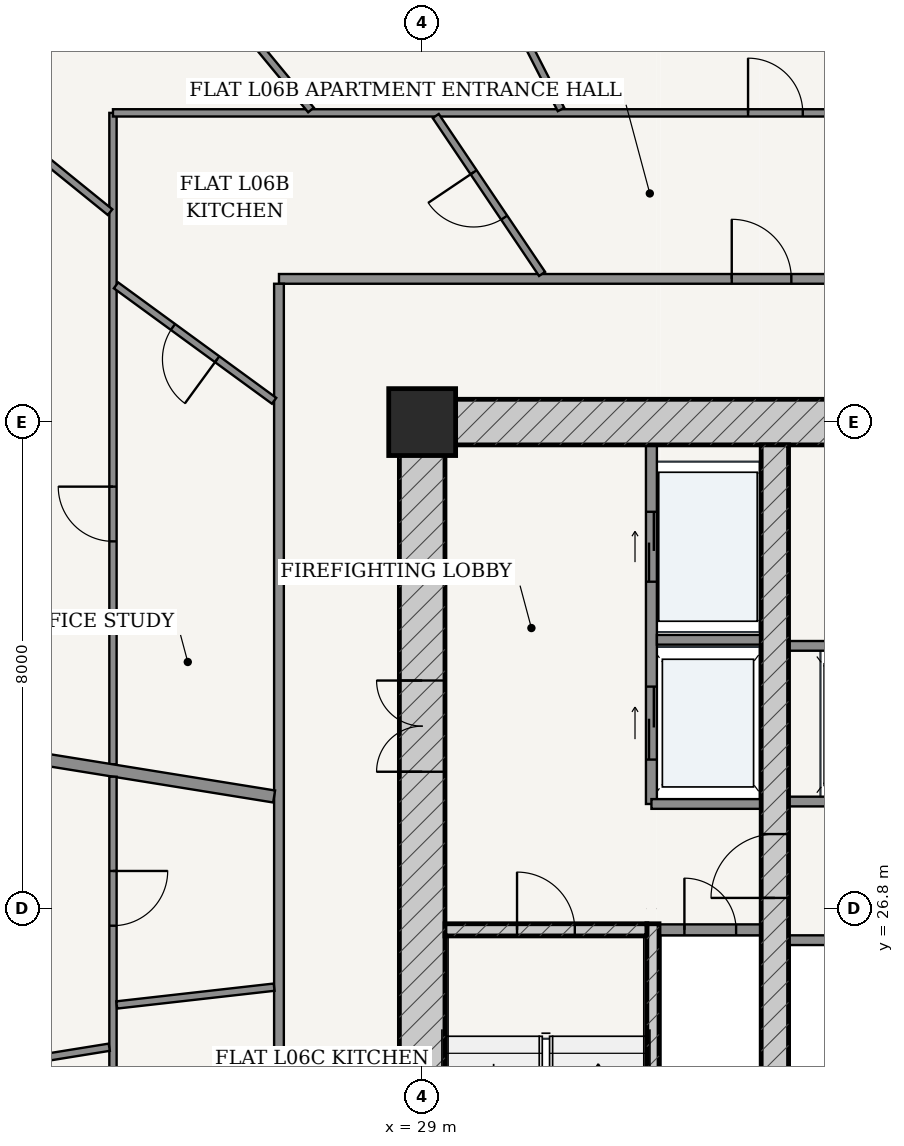
"""IFC4 building model, lengths in metres.
Left out: names, types, materials, properties, quantities, classifications, styles, units other than length and angle.
Written with IfcOpenShell. Run it as: python <this file> out.ifc"""

import sys

from ifc_helpers import new_model, si_unit, direction, frame, frame_2d, origin, origin_2d, place, context, subcontext, project, spatial, rectangle, extrude, source, transform, mapped, element, fill, save


model = new_model("IFC4")
c1 = context("Model", 3, precision=1e-05, world=origin(), true_north=direction((-0.2419218956, 0.970295726276)))
c2 = subcontext(c1, "Body", "Model", "MODEL_VIEW")
j1 = project(units=[si_unit("LENGTHUNIT", "METRE"), si_unit("PLANEANGLEUNIT", "RADIAN")], contexts=[c1])
p1 = place(None, origin())
s1 = spatial("IfcSite", under=j1, at=p1, CompositionType="ELEMENT")
p2 = place(p1, origin())
s2 = spatial("IfcBuilding", under=s1, at=p2, CompositionType="ELEMENT")
p3 = place(p2, frame((0.0, 0.0, 27.6)))
s3 = spatial("IfcBuildingStorey", under=s2, at=p3, CompositionType="ELEMENT", Elevation=27.6)
p4 = place(p3, frame((29.0, 34.8, 0.0), z_axis=(0.0, 0.0, 1.0), x_axis=(1.0, 0.0, 0.0)))
e1 = element("IfcColumn", 1, at=p4, inside=s3, PredefinedType="COLUMN", context=c2, shape_type="SweptSolid", body=[
    extrude(rectangle(XDim=1.1, YDim=1.1, at=origin_2d()), origin(), (0.0, 0.0, 1.0), 3.6),
])
p5 = place(p3, frame((28.625, 34.8, 0.0), z_axis=(0.0, 0.0, 1.0), x_axis=(1.0, 0.0, 0.0)))
e2 = element("IfcWall", 2, at=p5, inside=s3, PredefinedType="SHEAR", context=c2, shape_type="SweptSolid", body=[
    extrude(rectangle(XDim=18.75, YDim=0.75, at=frame_2d((9.375, 0.0))), origin(), (0.0, 0.0, 1.0), 3.32),
])
p6 = place(p5, frame((8.95, 0.0, 0.0)))
e3 = element("IfcOpeningElement", 3, at=p6, cuts=e2, PredefinedType="OPENING", context=c2, shape_type="SweptSolid", body=[
    extrude(rectangle(XDim=0.85, YDim=2.1, at=frame_2d((0.425, 1.05))), frame((0.0, 0.385, 0.0), z_axis=(0.0, -1.0, 0.0), x_axis=(1.0, 0.0, 0.0)), (0.0, 0.0, 1.0), 0.77),
])
p7 = place(p3, frame((29.0, 19.175, 0.0), z_axis=(0.0, 0.0, 1.0), x_axis=(0.0, 1.0, 0.0)))
e4 = element("IfcWall", 4, at=p7, inside=s3, PredefinedType="SHEAR", context=c2, shape_type="SweptSolid", body=[
    extrude(rectangle(XDim=15.25, YDim=0.75, at=frame_2d((7.625, 0.0))), origin(), (0.0, 0.0, 1.0), 3.32),
])
p8 = place(p7, frame((9.875, 0.0, 0.0)))
e5 = element("IfcOpeningElement", 5, at=p8, cuts=e4, PredefinedType="OPENING", context=c2, shape_type="SweptSolid", body=[
    extrude(rectangle(XDim=1.5, YDim=2.2, at=frame_2d((0.75, 1.1))), frame((0.0, 0.385, 0.0), z_axis=(0.0, -1.0, 0.0), x_axis=(1.0, 0.0, 0.0)), (0.0, 0.0, 1.0), 0.77),
])
p9 = place(p3, frame((32.795, 19.175, 0.0), z_axis=(0.0, 0.0, 1.0), x_axis=(0.0, 1.0, 0.0)))
e6 = element("IfcWall", 6, at=p9, inside=s3, PredefinedType="SOLIDWALL", context=c2, shape_type="SweptSolid", body=[
    extrude(rectangle(XDim=7.375, YDim=0.2, at=frame_2d((3.688, 0.0))), origin(), (0.0, 0.0, 1.0), 3.32),
])
p10 = place(p3, frame((29.375, 26.45, 0.0), z_axis=(0.0, 0.0, 1.0), x_axis=(1.0, 0.0, 0.0)))
e7 = element("IfcWall", 7, at=p10, inside=s3, PredefinedType="SOLIDWALL", context=c2, shape_type="SweptSolid", body=[
    extrude(rectangle(XDim=3.32, YDim=0.2, at=frame_2d((1.66, 0.0))), origin(), (0.0, 0.0, 1.0), 3.32),
])
p11 = place(p10, frame((1.185, 0.0, 0.0)))
e8 = element("IfcOpeningElement", 8, at=p11, cuts=e7, PredefinedType="OPENING", context=c2, shape_type="SweptSolid", body=[
    extrude(rectangle(XDim=0.95, YDim=2.15, at=frame_2d((0.475, 1.075))), frame((0.0, 0.11, 0.0), z_axis=(0.0, -1.0, 0.0), x_axis=(1.0, 0.0, 0.0)), (0.0, 0.0, 1.0), 0.22),
])
p12 = place(p3, frame((34.8, 19.175, 0.0), z_axis=(0.0, 0.0, 1.0), x_axis=(0.0, 1.0, 0.0)))
e9 = element("IfcWall", 9, at=p12, inside=s3, PredefinedType="SHEAR", context=c2, shape_type="SweptSolid", body=[
    extrude(rectangle(XDim=15.25, YDim=0.45, at=frame_2d((7.625, 0.0))), origin(), (0.0, 0.0, 1.0), 3.32),
])
p13 = place(p12, frame((7.8, 0.0, 0.0)))
e10 = element("IfcOpeningElement", 10, at=p13, cuts=e9, PredefinedType="OPENING", context=c2, shape_type="SweptSolid", body=[
    extrude(rectangle(XDim=1.05, YDim=2.15, at=frame_2d((0.525, 1.075))), frame((0.0, 0.235, 0.0), z_axis=(0.0, -1.0, 0.0), x_axis=(1.0, 0.0, 0.0)), (0.0, 0.0, 1.0), 0.47),
])
p14 = place(p3, frame((32.9, 26.45, 0.0), z_axis=(0.0, 0.0, 1.0), x_axis=(1.0, 0.0, 0.0)))
e11 = element("IfcWall", 11, at=p14, inside=s3, PredefinedType="PARTITIONING", context=c2, shape_type="SweptSolid", body=[
    extrude(rectangle(XDim=1.675, YDim=0.18, at=frame_2d((0.837, 0.0))), origin(), (0.0, 0.0, 1.0), 3.32),
])
p15 = place(p14, frame((0.413, 0.0, 0.0)))
e12 = element("IfcOpeningElement", 12, at=p15, cuts=e11, PredefinedType="OPENING", context=c2, shape_type="SweptSolid", body=[
    extrude(rectangle(XDim=0.85, YDim=2.1, at=frame_2d((0.425, 1.05))), frame((0.0, 0.1, 0.0), z_axis=(0.0, -1.0, 0.0), x_axis=(1.0, 0.0, 0.0)), (0.0, 0.0, 1.0), 0.2),
])
p16 = place(p3, frame((32.77, 28.52, 0.0), z_axis=(0.0, 0.0, 1.0), x_axis=(0.0, 1.0, 0.0)))
e13 = element("IfcWall", 13, at=p16, inside=s3, PredefinedType="PARTITIONING", context=c2, shape_type="SweptSolid", body=[
    extrude(rectangle(XDim=5.905, YDim=0.18, at=frame_2d((2.953, 0.0))), origin(), (0.0, 0.0, 1.0), 3.32),
])
p17 = place(p16, frame((3.655, 0.0, 0.0)))
e14 = element("IfcOpeningElement", 14, at=p17, cuts=e13, PredefinedType="OPENING", context=c2, shape_type="SweptSolid", body=[
    extrude(rectangle(XDim=1.15, YDim=2.2, at=frame_2d((0.575, 1.1))), frame((0.0, 0.1, 0.0), z_axis=(0.0, -1.0, 0.0), x_axis=(1.0, 0.0, 0.0)), (0.0, 0.0, 1.0), 0.2),
])
p18 = place(p16, frame((0.73, 0.0, 0.0)))
e15 = element("IfcOpeningElement", 15, at=p18, cuts=e13, PredefinedType="OPENING", context=c2, shape_type="SweptSolid", body=[
    extrude(rectangle(XDim=1.2, YDim=2.25, at=frame_2d((0.6, 1.125))), frame((0.0, 0.1, 0.0), z_axis=(0.0, -1.0, 0.0), x_axis=(1.0, 0.0, 0.0)), (0.0, 0.0, 1.0), 0.2),
])
p19 = place(p3, frame((32.86, 31.22, 0.0), z_axis=(0.0, 0.0, 1.0), x_axis=(1.0, 0.0, 0.0)))
e16 = element("IfcWall", 16, at=p19, inside=s3, PredefinedType="PARTITIONING", context=c2, shape_type="SweptSolid", body=[
    extrude(rectangle(XDim=1.715, YDim=0.16, at=frame_2d((0.857, 0.0))), origin(), (0.0, 0.0, 1.0), 3.32),
])
p20 = place(p3, frame((32.77, 28.52, 0.0), z_axis=(0.0, 0.0, 1.0), x_axis=(1.0, 0.0, 0.0)))
e17 = element("IfcWall", 17, at=p20, inside=s3, PredefinedType="PARTITIONING", context=c2, shape_type="SweptSolid", body=[
    extrude(rectangle(XDim=1.805, YDim=0.16, at=frame_2d((0.902, 0.0))), origin(), (0.0, 0.0, 1.0), 3.32),
])
p21 = place(p3, frame((35.025, 28.56, 0.0), z_axis=(0.0, 0.0, 1.0), x_axis=(1.0, 0.0, 0.0)))
e18 = element("IfcWall", 18, at=p21, inside=s3, PredefinedType="PARTITIONING", context=c2, shape_type="SweptSolid", body=[
    extrude(rectangle(XDim=5.95, YDim=0.16, at=frame_2d((2.975, 0.0))), origin(), (0.0, 0.0, 1.0), 3.32),
])
p22 = place(p21, frame((0.76, 0.0, 0.0)))
e19 = element("IfcOpeningElement", 19, at=p22, cuts=e18, PredefinedType="OPENING", context=c2, shape_type="SweptSolid", body=[
    extrude(rectangle(XDim=1.1, YDim=2.2, at=frame_2d((0.55, 1.1))), frame((0.0, 0.09, 0.0), z_axis=(0.0, -1.0, 0.0), x_axis=(1.0, 0.0, 0.0)), (0.0, 0.0, 1.0), 0.18),
])
p23 = place(p21, frame((2.425, 0.0, 0.0)))
e20 = element("IfcOpeningElement", 20, at=p23, cuts=e18, PredefinedType="OPENING", context=c2, shape_type="SweptSolid", body=[
    extrude(rectangle(XDim=1.1, YDim=2.2, at=frame_2d((0.55, 1.1))), frame((0.0, 0.09, 0.0), z_axis=(0.0, -1.0, 0.0), x_axis=(1.0, 0.0, 0.0)), (0.0, 0.0, 1.0), 0.18),
])
p24 = place(p21, frame((4.09, 0.0, 0.0)))
e21 = element("IfcOpeningElement", 21, at=p24, cuts=e18, PredefinedType="OPENING", context=c2, shape_type="SweptSolid", body=[
    extrude(rectangle(XDim=1.1, YDim=2.2, at=frame_2d((0.55, 1.1))), frame((0.0, 0.09, 0.0), z_axis=(0.0, -1.0, 0.0), x_axis=(1.0, 0.0, 0.0)), (0.0, 0.0, 1.0), 0.18),
])
for number, where, z_axis, x_axis in (
    (22, (35.025, 31.12, 0.0), (0.0, 0.0, 1.0), (1.0, 0.0, 0.0)),
    (23, (35.025, 26.28, 0.0), (0.0, 0.0, 1.0), (1.0, 0.0, 0.0)),
):
    element("IfcWall", number, at=place(p3, frame(where, z_axis=z_axis, x_axis=x_axis)), inside=s3, PredefinedType="PARTITIONING", context=c2, shape_type="SweptSolid", body=[
        extrude(rectangle(XDim=5.95, YDim=0.16, at=frame_2d((2.975, 0.0))), origin(), (0.0, 0.0, 1.0), 3.32),
    ])
p25 = place(p3, frame((26.645, 37.155, 0.0), z_axis=(0.0, 0.0, 1.0), x_axis=(1.0, 0.0, 0.0)))
e24 = element("IfcWall", 24, at=p25, inside=s3, PredefinedType="PARTITIONING", context=c2, shape_type="SweptSolid", body=[
    extrude(rectangle(XDim=22.71, YDim=0.16, at=frame_2d((11.355, 0.0))), origin(), (0.0, 0.0, 1.0), 2.688),
])
p26 = place(p25, frame((7.446, 0.0, 0.0)))
e25 = element("IfcOpeningElement", 25, at=p26, cuts=e24, PredefinedType="OPENING", context=c2, shape_type="SweptSolid", body=[
    extrude(rectangle(XDim=0.98, YDim=2.2, at=frame_2d((0.49, 1.1))), frame((0.0, 0.09, 0.0), z_axis=(0.0, -1.0, 0.0), x_axis=(1.0, 0.0, 0.0)), (0.0, 0.0, 1.0), 0.18),
])
p27 = place(p3, frame((26.645, 16.525, 0.0), z_axis=(0.0, 0.0, 1.0), x_axis=(0.0, 1.0, 0.0)))
e26 = element("IfcWall", 26, at=p27, inside=s3, PredefinedType="PARTITIONING", context=c2, shape_type="SweptSolid", body=[
    extrude(rectangle(XDim=20.55, YDim=0.16, at=frame_2d((10.275, 0.0))), origin(), (0.0, 0.0, 1.0), 2.688),
])
p28 = place(p3, frame((23.915, 29.172, 0.0), z_axis=(0.0, 0.0, 1.0), x_axis=(0.0, 1.0, 0.0)))
e27 = element("IfcWall", 27, at=p28, inside=s3, PredefinedType="PARTITIONING", context=c2, shape_type="SweptSolid", body=[
    extrude(rectangle(XDim=10.713, YDim=0.12, at=frame_2d((5.356, 0.0))), origin(), (0.0, 0.0, 1.0), 2.688),
])
p29 = place(p28, frame((3.666, 0.0, 0.0)))
e28 = element("IfcOpeningElement", 28, at=p29, cuts=e27, PredefinedType="OPENING", context=c2, shape_type="SweptSolid", body=[
    extrude(rectangle(XDim=0.9, YDim=2.15, at=frame_2d((0.45, 1.075))), frame((0.0, 0.07, 0.0), z_axis=(0.0, -1.0, 0.0), x_axis=(1.0, 0.0, 0.0)), (0.0, 0.0, 1.0), 0.14),
])
p30 = place(p3, frame((23.915, 39.885, 0.0), z_axis=(0.0, 0.0, 1.0), x_axis=(1.0, 0.0, 0.0)))
e29 = element("IfcWall", 29, at=p30, inside=s3, PredefinedType="PARTITIONING", context=c2, shape_type="SweptSolid", body=[
    extrude(rectangle(XDim=20.671, YDim=0.12, at=frame_2d((10.336, 0.0))), origin(), (0.0, 0.0, 1.0), 2.688),
])
p31 = place(p30, frame((10.444, 0.0, 0.0)))
e30 = element("IfcOpeningElement", 30, at=p31, cuts=e29, PredefinedType="OPENING", context=c2, shape_type="SweptSolid", body=[
    extrude(rectangle(XDim=0.9, YDim=2.15, at=frame_2d((0.45, 1.075))), frame((0.0, 0.07, 0.0), z_axis=(0.0, -1.0, 0.0), x_axis=(1.0, 0.0, 0.0)), (0.0, 0.0, 1.0), 0.14),
])
p32 = place(p3, frame((31.283, 39.94, 0.0), z_axis=(0.0, 0.0, 1.0), x_axis=(-0.455131303234, 0.890424335256, 0.0)))
e31 = element("IfcWall", 31, at=p32, inside=s3, PredefinedType="PARTITIONING", context=c2, shape_type="SweptSolid", body=[
    extrude(rectangle(XDim=9.562, YDim=0.12, at=frame_2d((4.781, 0.0))), origin(), (0.0, 0.0, 1.0), 2.762),
])
p33 = place(p32, frame((4.331, 0.0, 0.0)))
e32 = element("IfcOpeningElement", 32, at=p33, cuts=e31, PredefinedType="OPENING", context=c2, shape_type="SweptSolid", body=[
    extrude(rectangle(XDim=0.9, YDim=2.15, at=frame_2d((0.45, 1.075))), frame((0.0, 0.07, 0.0), z_axis=(0.0, -1.0, 0.0), x_axis=(1.0, 0.0, 0.0)), (0.0, 0.0, 1.0), 0.14),
])
p34 = place(p3, frame((27.171, 39.933, 0.0), z_axis=(0.0, 0.0, 1.0), x_axis=(-0.636192172227, 0.771530634516, 0.0)))
e33 = element("IfcWall", 33, at=p34, inside=s3, PredefinedType="PARTITIONING", context=c2, shape_type="SweptSolid", body=[
    extrude(rectangle(XDim=8.186, YDim=0.12, at=frame_2d((4.093, 0.0))), origin(), (0.0, 0.0, 1.0), 2.688),
])
p35 = place(p34, frame((2.579, 0.0, 0.0)))
e34 = element("IfcOpeningElement", 34, at=p35, cuts=e33, PredefinedType="OPENING", context=c2, shape_type="SweptSolid", body=[
    extrude(rectangle(XDim=0.9, YDim=2.15, at=frame_2d((0.45, 1.075))), frame((0.0, 0.07, 0.0), z_axis=(0.0, -1.0, 0.0), x_axis=(1.0, 0.0, 0.0)), (0.0, 0.0, 1.0), 0.14),
])
p36 = place(p3, frame((23.867, 38.253, 0.0), z_axis=(0.0, 0.0, 1.0), x_axis=(-0.776936623447, 0.629578814087, 0.0)))
e35 = element("IfcWall", 35, at=p36, inside=s3, PredefinedType="PARTITIONING", context=c2, shape_type="SweptSolid", body=[
    extrude(rectangle(XDim=8.136, YDim=0.12, at=frame_2d((4.068, 0.0))), origin(), (0.0, 0.0, 1.0), 2.762),
])
p37 = place(p3, frame((30.972, 37.237, 0.0), z_axis=(0.0, 0.0, 1.0), x_axis=(-0.558563154585, 0.829461995717, 0.0)))
e36 = element("IfcWall", 36, at=p37, inside=s3, PredefinedType="PARTITIONING", context=c2, shape_type="SweptSolid", body=[
    extrude(rectangle(XDim=3.131, YDim=0.12, at=frame_2d((1.565, 0.0))), origin(), (0.0, 0.0, 1.0), 3.32),
])
p38 = place(p37, frame((1.115, 0.0, 0.0)))
e37 = element("IfcOpeningElement", 37, at=p38, cuts=e36, PredefinedType="OPENING", context=c2, shape_type="SweptSolid", body=[
    extrude(rectangle(XDim=0.9, YDim=2.15, at=frame_2d((0.45, 1.075))), frame((0.0, 0.07, 0.0), z_axis=(0.0, -1.0, 0.0), x_axis=(1.0, 0.0, 0.0)), (0.0, 0.0, 1.0), 0.14),
])
p39 = place(p3, frame((26.565, 35.15, 0.0), z_axis=(0.0, 0.0, 1.0), x_axis=(-0.807606444557, 0.589721824855, 0.0)))
e38 = element("IfcWall", 38, at=p39, inside=s3, PredefinedType="PARTITIONING", context=c2, shape_type="SweptSolid", body=[
    extrude(rectangle(XDim=3.219, YDim=0.12, at=frame_2d((1.61, 0.0))), origin(), (0.0, 0.0, 1.0), 3.32),
])
p40 = place(p39, frame((1.16, 0.0, 0.0)))
e39 = element("IfcOpeningElement", 39, at=p40, cuts=e38, PredefinedType="OPENING", context=c2, shape_type="SweptSolid", body=[
    extrude(rectangle(XDim=0.9, YDim=2.15, at=frame_2d((0.45, 1.075))), frame((0.0, 0.07, 0.0), z_axis=(0.0, -1.0, 0.0), x_axis=(1.0, 0.0, 0.0)), (0.0, 0.0, 1.0), 0.14),
])
p41 = place(p3, frame((26.565, 28.643, 0.0), z_axis=(0.0, 0.0, 1.0), x_axis=(-0.987255953651, 0.159140447344, 0.0)))
e40 = element("IfcWall", 40, at=p41, inside=s3, PredefinedType="PARTITIONING", context=c2, shape_type="SweptSolid", body=[
    extrude(rectangle(XDim=17.105, YDim=0.2, at=frame_2d((8.553, 0.0))), origin(), (0.0, 0.0, 1.0), 2.688),
])
p42 = place(p3, frame((23.915, 13.715, 0.0), z_axis=(0.0, 0.0, 1.0), x_axis=(0.0, 1.0, 0.0)))
e41 = element("IfcWall", 41, at=p42, inside=s3, PredefinedType="PARTITIONING", context=c2, shape_type="SweptSolid", body=[
    extrude(rectangle(XDim=15.253, YDim=0.12, at=frame_2d((7.626, 0.0))), origin(), (0.0, 0.0, 1.0), 2.688),
])
p43 = place(p42, frame((7.663, 0.0, 0.0)))
e42 = element("IfcOpeningElement", 42, at=p43, cuts=e41, PredefinedType="OPENING", context=c2, shape_type="SweptSolid", body=[
    extrude(rectangle(XDim=0.9, YDim=2.15, at=frame_2d((0.45, 1.075))), frame((0.0, 0.07, 0.0), z_axis=(0.0, -1.0, 0.0), x_axis=(1.0, 0.0, 0.0)), (0.0, 0.0, 1.0), 0.14),
])
p44 = place(p42, frame((12.803, 0.0, 0.0)))
e43 = element("IfcOpeningElement", 43, at=p44, cuts=e41, PredefinedType="OPENING", context=c2, shape_type="SweptSolid", body=[
    extrude(rectangle(XDim=0.9, YDim=2.15, at=frame_2d((0.45, 1.075))), frame((0.0, 0.07, 0.0), z_axis=(0.0, -1.0, 0.0), x_axis=(1.0, 0.0, 0.0)), (0.0, 0.0, 1.0), 0.14),
])
p45 = place(p3, frame((23.854, 24.52, 0.0), z_axis=(0.0, 0.0, 1.0), x_axis=(-0.987258444847, -0.159124991997, 0.0)))
e44 = element("IfcWall", 44, at=p45, inside=s3, PredefinedType="PARTITIONING", context=c2, shape_type="SweptSolid", body=[
    extrude(rectangle(XDim=14.359, YDim=0.12, at=frame_2d((7.18, 0.0))), origin(), (0.0, 0.0, 1.0), 2.688),
])
p46 = place(p45, frame((5.659, 0.0, 0.0)))
e45 = element("IfcOpeningElement", 45, at=p46, cuts=e44, PredefinedType="OPENING", context=c2, shape_type="SweptSolid", body=[
    extrude(rectangle(XDim=0.9, YDim=2.15, at=frame_2d((0.45, 1.075))), frame((0.0, 0.07, 0.0), z_axis=(0.0, -1.0, 0.0), x_axis=(1.0, 0.0, 0.0)), (0.0, 0.0, 1.0), 0.14),
])
p47 = place(p3, frame((26.565, 25.507, 0.0), z_axis=(0.0, 0.0, 1.0), x_axis=(-0.993676271227, -0.112282981789, 0.0)))
e46 = element("IfcWall", 46, at=p47, inside=s3, PredefinedType="PARTITIONING", context=c2, shape_type="SweptSolid", body=[
    extrude(rectangle(XDim=2.605, YDim=0.12, at=frame_2d((1.302, 0.0))), origin(), (0.0, 0.0, 1.0), 3.32),
])
m1 = source(origin(), c2, "Body", "SweptSolid", [
    extrude(rectangle(XDim=1.5, YDim=2.2, at=frame_2d((0.75, 1.1))), frame((0.0, 0.025, 0.0), z_axis=(0.0, -1.0, 0.0), x_axis=(1.0, 0.0, 0.0)), (0.0, 0.0, 1.0), 0.05),
])
p48 = place(p8, origin())
e47 = element("IfcDoor", 47, at=p48, inside=s3, OperationType="DOUBLE_DOOR_SINGLE_SWING", PredefinedType="DOOR", context=c2, shape_type="MappedRepresentation", body=[
    mapped(m1, transform((0.0, 0.0, 0.0), scale=1.0)),
])
fill(e5, e47)
m2 = source(origin(), c2, "Body", "SweptSolid", [
    extrude(rectangle(XDim=1.05, YDim=2.15, at=frame_2d((0.525, 1.075))), frame((0.0, 0.025, 0.0), z_axis=(0.0, -1.0, 0.0), x_axis=(1.0, 0.0, 0.0)), (0.0, 0.0, 1.0), 0.05),
])
p49 = place(p13, origin())
e48 = element("IfcDoor", 48, at=p49, inside=s3, OperationType="SINGLE_SWING_LEFT", PredefinedType="DOOR", context=c2, shape_type="MappedRepresentation", body=[
    mapped(m2, transform((0.0, 0.0, 0.0), scale=1.0)),
])
fill(e10, e48)
m3 = source(origin(), c2, "Body", "SweptSolid", [
    extrude(rectangle(XDim=0.95, YDim=2.15, at=frame_2d((0.475, 1.075))), frame((0.0, 0.025, 0.0), z_axis=(0.0, -1.0, 0.0), x_axis=(1.0, 0.0, 0.0)), (0.0, 0.0, 1.0), 0.05),
])
p50 = place(p11, origin())
e49 = element("IfcDoor", 49, at=p50, inside=s3, OperationType="SINGLE_SWING_LEFT", PredefinedType="DOOR", context=c2, shape_type="MappedRepresentation", body=[
    mapped(m3, transform((0.0, 0.0, 0.0), scale=1.0)),
])
fill(e8, e49)
m4 = source(origin(), c2, "Body", "SweptSolid", [
    extrude(rectangle(XDim=0.85, YDim=2.1, at=frame_2d((0.425, 1.05))), frame((0.0, 0.025, 0.0), z_axis=(0.0, -1.0, 0.0), x_axis=(1.0, 0.0, 0.0)), (0.0, 0.0, 1.0), 0.05),
])
p51 = place(p15, origin())
e50 = element("IfcDoor", 50, at=p51, inside=s3, OperationType="SINGLE_SWING_LEFT", PredefinedType="DOOR", context=c2, shape_type="MappedRepresentation", body=[
    mapped(m4, transform((0.0, 0.0, 0.0), scale=1.0)),
])
fill(e12, e50)
m5 = source(origin(), c2, "Body", "SweptSolid", [
    extrude(rectangle(XDim=1.15, YDim=2.2, at=frame_2d((0.575, 1.1))), frame((0.0, 0.025, 0.0), z_axis=(0.0, -1.0, 0.0), x_axis=(1.0, 0.0, 0.0)), (0.0, 0.0, 1.0), 0.05),
])
p52 = place(p17, origin())
e51 = element("IfcDoor", 51, at=p52, inside=s3, OperationType="DOUBLE_DOOR_SLIDING", PredefinedType="DOOR", context=c2, shape_type="MappedRepresentation", body=[
    mapped(m5, transform((0.0, 0.0, 0.0), scale=1.0)),
])
fill(e14, e51)
m6 = source(origin(), c2, "Body", "SweptSolid", [
    extrude(rectangle(XDim=1.2, YDim=2.25, at=frame_2d((0.6, 1.125))), frame((0.0, 0.025, 0.0), z_axis=(0.0, -1.0, 0.0), x_axis=(1.0, 0.0, 0.0)), (0.0, 0.0, 1.0), 0.05),
])
p53 = place(p18, origin())
e52 = element("IfcDoor", 52, at=p53, inside=s3, OperationType="DOUBLE_DOOR_SLIDING", PredefinedType="DOOR", context=c2, shape_type="MappedRepresentation", body=[
    mapped(m6, transform((0.0, 0.0, 0.0), scale=1.0)),
])
fill(e15, e52)
m7 = source(origin(), c2, "Body", "SweptSolid", [
    extrude(rectangle(XDim=0.98, YDim=2.2, at=frame_2d((0.49, 1.1))), frame((0.0, 0.025, 0.0), z_axis=(0.0, -1.0, 0.0), x_axis=(1.0, 0.0, 0.0)), (0.0, 0.0, 1.0), 0.05),
])
p54 = place(p26, origin())
e53 = element("IfcDoor", 53, at=p54, inside=s3, OperationType="SINGLE_SWING_LEFT", PredefinedType="DOOR", context=c2, shape_type="MappedRepresentation", body=[
    mapped(m7, transform((0.0, 0.0, 0.0), scale=1.0)),
])
fill(e25, e53)
m8 = source(origin(), c2, "Body", "SweptSolid", [
    extrude(rectangle(XDim=0.9, YDim=2.15, at=frame_2d((0.45, 1.075))), frame((0.0, 0.025, 0.0), z_axis=(0.0, -1.0, 0.0), x_axis=(1.0, 0.0, 0.0)), (0.0, 0.0, 1.0), 0.05),
])
p55 = place(p31, origin())
e54 = element("IfcDoor", 54, at=p55, inside=s3, OperationType="SINGLE_SWING_LEFT", PredefinedType="DOOR", context=c2, shape_type="MappedRepresentation", body=[
    mapped(m8, transform((0.0, 0.0, 0.0), scale=1.0)),
])
fill(e30, e54)
p56 = place(p38, origin())
e55 = element("IfcDoor", 55, at=p56, inside=s3, OperationType="SINGLE_SWING_RIGHT", PredefinedType="DOOR", context=c2, shape_type="MappedRepresentation", body=[
    mapped(m8, transform((0.0, 0.0, 0.0), scale=1.0)),
])
fill(e37, e55)
p57 = place(p40, origin())
e56 = element("IfcDoor", 56, at=p57, inside=s3, OperationType="SINGLE_SWING_LEFT", PredefinedType="DOOR", context=c2, shape_type="MappedRepresentation", body=[
    mapped(m8, transform((0.0, 0.0, 0.0), scale=1.0)),
])
fill(e39, e56)
p58 = place(p29, origin())
e57 = element("IfcDoor", 57, at=p58, inside=s3, OperationType="SINGLE_SWING_RIGHT", PredefinedType="DOOR", context=c2, shape_type="MappedRepresentation", body=[
    mapped(m8, transform((0.0, 0.0, 0.0), scale=1.0)),
])
fill(e28, e57)
p59 = place(p44, frame((0.9, 0.0, 0.0), z_axis=(0.0, 0.0, 1.0), x_axis=(-1.0, 0.0, 0.0)))
e58 = element("IfcDoor", 58, at=p59, inside=s3, OperationType="SINGLE_SWING_LEFT", PredefinedType="DOOR", context=c2, shape_type="MappedRepresentation", body=[
    mapped(m8, transform((0.0, 0.0, 0.0), scale=1.0)),
])
fill(e43, e58)
save(model, sys.argv[1])
